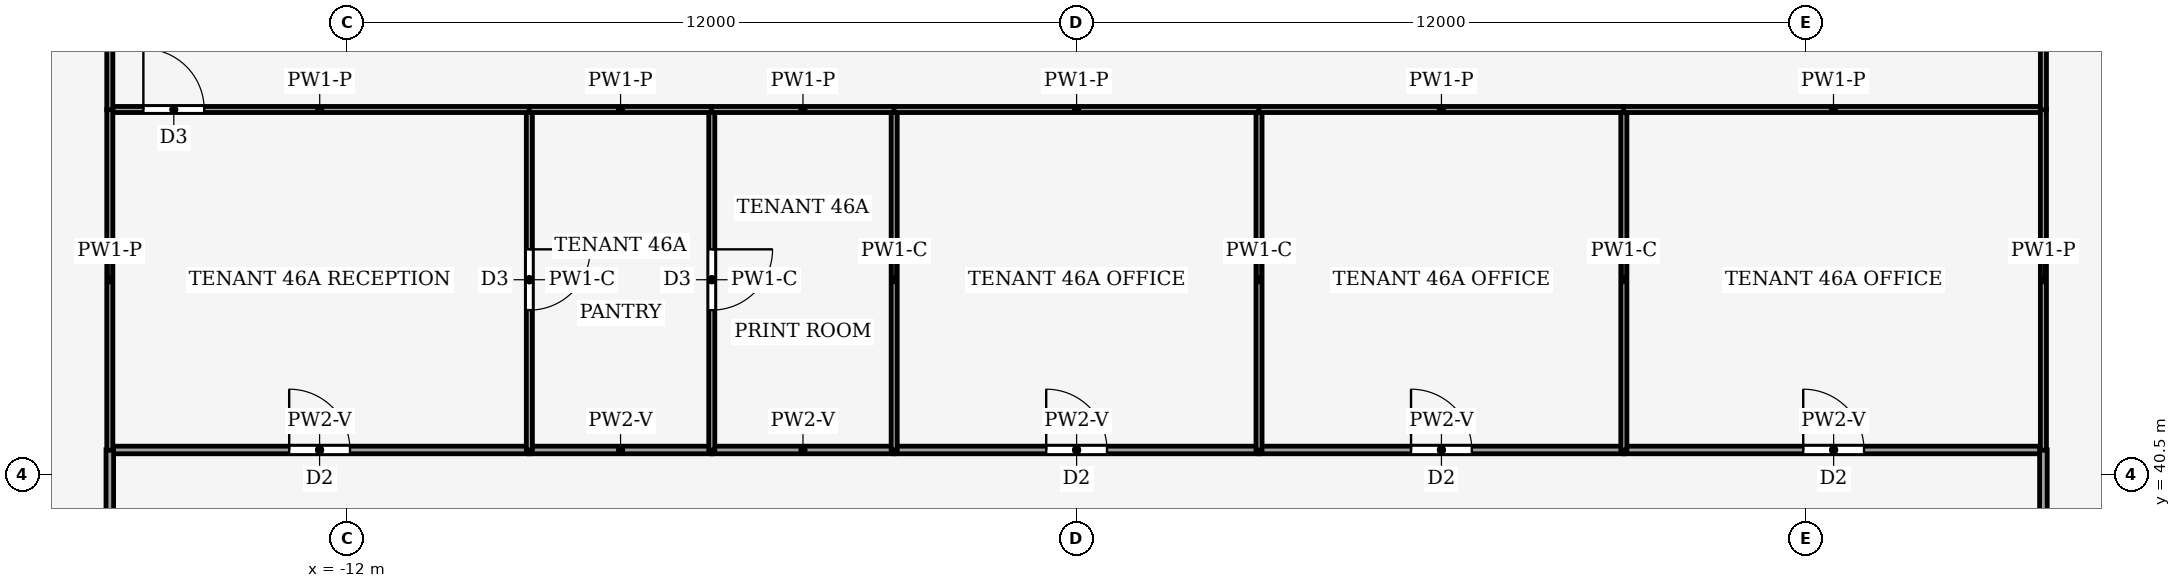
"""IFC4 building model, lengths in metres.
Left out: names, types, materials, properties, quantities, classifications, styles, units other than length and angle.
Written with IfcOpenShell. Run it as: python <this file> out.ifc"""

import sys

from ifc_helpers import new_model, si_unit, direction, frame, frame_2d, origin, place, context, subcontext, project, spatial, rectangle, extrude, element, fill, save


model = new_model("IFC4")
c1 = context("Model", 3, precision=1e-05, world=origin(), true_north=direction((0.0, 1.0)))
c2 = subcontext(c1, "Body", "Model", "MODEL_VIEW")
j1 = project(units=[si_unit("LENGTHUNIT", "METRE"), si_unit("PLANEANGLEUNIT", "RADIAN")], contexts=[c1])
p1 = place(None, origin())
s1 = spatial("IfcSite", under=j1, at=p1, CompositionType="ELEMENT")
p2 = place(p1, origin())
s2 = spatial("IfcBuilding", under=s1, at=p2, CompositionType="ELEMENT")
p3 = place(p2, frame((0.0, 0.0, 202.0)))
s3 = spatial("IfcBuildingStorey", under=s2, at=p3, CompositionType="ELEMENT", Elevation=202.0)
p4 = place(p3, frame((-15.9, 40.9, 0.0), z_axis=(0.0, 0.0, 1.0), x_axis=(1.0, 0.0, 0.0)))
e1 = element("IfcWall", 1, at=p4, inside=s3, PredefinedType="PARTITIONING", context=c2, shape_type="SweptSolid", body=[
    extrude(rectangle(XDim=6.9, YDim=0.125, at=frame_2d((3.45, 0.0))), origin(), (0.0, 0.0, 1.0), 3.44),
])
p5 = place(p4, frame((2.95, 0.0, 0.0)))
e2 = element("IfcOpeningElement", 2, at=p5, cuts=e1, PredefinedType="OPENING", context=c2, shape_type="SweptSolid", body=[
    extrude(rectangle(XDim=1.0, YDim=2.1, at=frame_2d((0.5, 1.05))), frame((0.0, 0.073, 0.0), z_axis=(0.0, -1.0, 0.0), x_axis=(1.0, 0.0, 0.0)), (0.0, 0.0, 1.0), 0.145),
])
for number, where, z_axis, x_axis in (
    (3, (-6.0, 40.9, 0.0), (0.0, 0.0, 1.0), (-1.0, 0.0, 0.0)),
    (4, (-3.0, 40.9, 0.0), (0.0, 0.0, 1.0), (-1.0, 0.0, 0.0)),
):
    element("IfcWall", number, at=place(p3, frame(where, z_axis=z_axis, x_axis=x_axis)), inside=s3, PredefinedType="PARTITIONING", context=c2, shape_type="SweptSolid", body=[
        extrude(rectangle(XDim=3.0, YDim=0.125, at=frame_2d((1.5, 0.0))), origin(), (0.0, 0.0, 1.0), 3.44),
    ])
p6 = place(p3, frame((-3.0, 40.9, 0.0), z_axis=(0.0, 0.0, 1.0), x_axis=(1.0, 0.0, 0.0)))
e5 = element("IfcWall", 5, at=p6, inside=s3, PredefinedType="PARTITIONING", context=c2, shape_type="SweptSolid", body=[
    extrude(rectangle(XDim=6.0, YDim=0.125, at=frame_2d((3.0, 0.0))), origin(), (0.0, 0.0, 1.0), 3.44),
])
p7 = place(p6, frame((2.5, 0.0, 0.0)))
e6 = element("IfcOpeningElement", 6, at=p7, cuts=e5, PredefinedType="OPENING", context=c2, shape_type="SweptSolid", body=[
    extrude(rectangle(XDim=1.0, YDim=2.1, at=frame_2d((0.5, 1.05))), frame((0.0, 0.073, 0.0), z_axis=(0.0, -1.0, 0.0), x_axis=(1.0, 0.0, 0.0)), (0.0, 0.0, 1.0), 0.145),
])
p8 = place(p3, frame((3.0, 40.9, 0.0), z_axis=(0.0, 0.0, 1.0), x_axis=(1.0, 0.0, 0.0)))
e7 = element("IfcWall", 7, at=p8, inside=s3, PredefinedType="PARTITIONING", context=c2, shape_type="SweptSolid", body=[
    extrude(rectangle(XDim=6.0, YDim=0.125, at=frame_2d((3.0, 0.0))), origin(), (0.0, 0.0, 1.0), 3.44),
])
p9 = place(p8, frame((2.5, 0.0, 0.0)))
e8 = element("IfcOpeningElement", 8, at=p9, cuts=e7, PredefinedType="OPENING", context=c2, shape_type="SweptSolid", body=[
    extrude(rectangle(XDim=1.0, YDim=2.1, at=frame_2d((0.5, 1.05))), frame((0.0, 0.073, 0.0), z_axis=(0.0, -1.0, 0.0), x_axis=(1.0, 0.0, 0.0)), (0.0, 0.0, 1.0), 0.145),
])
p10 = place(p3, frame((9.0, 40.9, 0.0), z_axis=(0.0, 0.0, 1.0), x_axis=(1.0, 0.0, 0.0)))
e9 = element("IfcWall", 9, at=p10, inside=s3, PredefinedType="PARTITIONING", context=c2, shape_type="SweptSolid", body=[
    extrude(rectangle(XDim=6.9, YDim=0.125, at=frame_2d((3.45, 0.0))), origin(), (0.0, 0.0, 1.0), 3.44),
])
p11 = place(p10, frame((2.95, 0.0, 0.0)))
e10 = element("IfcOpeningElement", 10, at=p11, cuts=e9, PredefinedType="OPENING", context=c2, shape_type="SweptSolid", body=[
    extrude(rectangle(XDim=1.0, YDim=2.1, at=frame_2d((0.5, 1.05))), frame((0.0, 0.073, 0.0), z_axis=(0.0, -1.0, 0.0), x_axis=(1.0, 0.0, 0.0)), (0.0, 0.0, 1.0), 0.145),
])
p12 = place(p3, frame((-15.9, 34.5, 0.0), z_axis=(0.0, 0.0, 1.0), x_axis=(0.0, 1.0, 0.0)))
e11 = element("IfcWall", 11, at=p12, inside=s3, PredefinedType="PARTITIONING", context=c2, shape_type="SweptSolid", body=[
    extrude(rectangle(XDim=6.404, YDim=0.125, at=frame_2d((3.202, 0.0))), origin(), (0.0, 0.0, 1.0), 3.14),
])
p13 = place(p12, frame((2.702, 0.0, 0.0)))
e12 = element("IfcOpeningElement", 12, at=p13, cuts=e11, PredefinedType="OPENING", context=c2, shape_type="SweptSolid", body=[
    extrude(rectangle(XDim=1.0, YDim=2.1, at=frame_2d((0.5, 1.05))), frame((0.0, 0.073, 0.0), z_axis=(0.0, -1.0, 0.0), x_axis=(1.0, 0.0, 0.0)), (0.0, 0.0, 1.0), 0.145),
])
p14 = place(p3, frame((15.9, 40.904, 0.0), z_axis=(0.0, 0.0, 1.0), x_axis=(0.0, -1.0, 0.0)))
e13 = element("IfcWall", 13, at=p14, inside=s3, PredefinedType="PARTITIONING", context=c2, shape_type="SweptSolid", body=[
    extrude(rectangle(XDim=3.404, YDim=0.125, at=frame_2d((1.702, 0.0))), origin(), (0.0, 0.0, 1.0), 3.14),
])
p15 = place(p14, frame((1.202, 0.0, 0.0)))
e14 = element("IfcOpeningElement", 14, at=p15, cuts=e13, PredefinedType="OPENING", context=c2, shape_type="SweptSolid", body=[
    extrude(rectangle(XDim=1.0, YDim=2.1, at=frame_2d((0.5, 1.05))), frame((0.0, 0.073, 0.0), z_axis=(0.0, -1.0, 0.0), x_axis=(1.0, 0.0, 0.0)), (0.0, 0.0, 1.0), 0.145),
])
p16 = place(p3, frame((-9.0, 46.5, 0.0), z_axis=(0.0, 0.0, 1.0), x_axis=(0.0, -1.0, 0.0)))
e15 = element("IfcWall", 15, at=p16, inside=s3, PredefinedType="PARTITIONING", context=c2, shape_type="SweptSolid", body=[
    extrude(rectangle(XDim=5.6, YDim=0.1, at=frame_2d((2.8, 0.0))), origin(), (0.0, 0.0, 1.0), 3.87),
])
p17 = place(p16, frame((2.3, 0.0, 0.0)))
e16 = element("IfcOpeningElement", 16, at=p17, cuts=e15, PredefinedType="OPENING", context=c2, shape_type="SweptSolid", body=[
    extrude(rectangle(XDim=1.0, YDim=2.1, at=frame_2d((0.5, 1.05))), frame((0.0, 0.06, 0.0), z_axis=(0.0, -1.0, 0.0), x_axis=(1.0, 0.0, 0.0)), (0.0, 0.0, 1.0), 0.12),
])
p18 = place(p3, frame((-15.9, 46.5, 0.0), z_axis=(0.0, 0.0, 1.0), x_axis=(1.0, 0.0, 0.0)))
e17 = element("IfcWall", 17, at=p18, inside=s3, PredefinedType="PARTITIONING", context=c2, shape_type="SweptSolid", body=[
    extrude(rectangle(XDim=6.904, YDim=0.1, at=frame_2d((3.452, 0.0))), origin(), (0.0, 0.0, 1.0), 3.44),
])
p19 = place(p18, frame((0.552, 0.0, 0.0)))
e18 = element("IfcOpeningElement", 18, at=p19, cuts=e17, PredefinedType="OPENING", context=c2, shape_type="SweptSolid", body=[
    extrude(rectangle(XDim=1.0, YDim=2.1, at=frame_2d((0.5, 1.05))), frame((0.0, 0.06, 0.0), z_axis=(0.0, -1.0, 0.0), x_axis=(1.0, 0.0, 0.0)), (0.0, 0.0, 1.0), 0.12),
])
p20 = place(p3, frame((-15.9, 46.504, 0.0), z_axis=(0.0, 0.0, 1.0), x_axis=(0.0, -1.0, 0.0)))
e19 = element("IfcWall", 19, at=p20, inside=s3, PredefinedType="PARTITIONING", context=c2, shape_type="SweptSolid", body=[
    extrude(rectangle(XDim=5.608, YDim=0.1, at=frame_2d((2.804, 0.0))), origin(), (0.0, 0.0, 1.0), 3.44),
])
p21 = place(p3, frame((-6.0, 46.5, 0.0), z_axis=(0.0, 0.0, 1.0), x_axis=(0.0, -1.0, 0.0)))
e20 = element("IfcWall", 20, at=p21, inside=s3, PredefinedType="PARTITIONING", context=c2, shape_type="SweptSolid", body=[
    extrude(rectangle(XDim=5.6, YDim=0.1, at=frame_2d((2.8, 0.0))), origin(), (0.0, 0.0, 1.0), 3.87),
])
p22 = place(p21, frame((2.3, 0.0, 0.0)))
e21 = element("IfcOpeningElement", 21, at=p22, cuts=e20, PredefinedType="OPENING", context=c2, shape_type="SweptSolid", body=[
    extrude(rectangle(XDim=1.0, YDim=2.1, at=frame_2d((0.5, 1.05))), frame((0.0, 0.06, 0.0), z_axis=(0.0, -1.0, 0.0), x_axis=(1.0, 0.0, 0.0)), (0.0, 0.0, 1.0), 0.12),
])
p23 = place(p3, frame((-5.996, 46.5, 0.0), z_axis=(0.0, 0.0, 1.0), x_axis=(-1.0, 0.0, 0.0)))
e22 = element("IfcWall", 22, at=p23, inside=s3, PredefinedType="PARTITIONING", context=c2, shape_type="SweptSolid", body=[
    extrude(rectangle(XDim=3.008, YDim=0.1, at=frame_2d((1.504, 0.0))), origin(), (0.0, 0.0, 1.0), 3.44),
])
p24 = place(p3, frame((-3.0, 40.9, 0.0), z_axis=(0.0, 0.0, 1.0), x_axis=(0.0, 1.0, 0.0)))
e23 = element("IfcWall", 23, at=p24, inside=s3, PredefinedType="PARTITIONING", context=c2, shape_type="SweptSolid", body=[
    extrude(rectangle(XDim=5.6, YDim=0.1, at=frame_2d((2.8, 0.0))), origin(), (0.0, 0.0, 1.0), 3.87),
])
p25 = place(p3, frame((-2.996, 46.5, 0.0), z_axis=(0.0, 0.0, 1.0), x_axis=(-1.0, 0.0, 0.0)))
e24 = element("IfcWall", 24, at=p25, inside=s3, PredefinedType="PARTITIONING", context=c2, shape_type="SweptSolid", body=[
    extrude(rectangle(XDim=3.008, YDim=0.1, at=frame_2d((1.504, 0.0))), origin(), (0.0, 0.0, 1.0), 3.44),
])
p26 = place(p3, frame((3.0, 40.9, 0.0), z_axis=(0.0, 0.0, 1.0), x_axis=(0.0, 1.0, 0.0)))
e25 = element("IfcWall", 25, at=p26, inside=s3, PredefinedType="PARTITIONING", context=c2, shape_type="SweptSolid", body=[
    extrude(rectangle(XDim=5.6, YDim=0.1, at=frame_2d((2.8, 0.0))), origin(), (0.0, 0.0, 1.0), 3.87),
])
p27 = place(p3, frame((3.004, 46.5, 0.0), z_axis=(0.0, 0.0, 1.0), x_axis=(-1.0, 0.0, 0.0)))
e26 = element("IfcWall", 26, at=p27, inside=s3, PredefinedType="PARTITIONING", context=c2, shape_type="SweptSolid", body=[
    extrude(rectangle(XDim=6.008, YDim=0.1, at=frame_2d((3.004, 0.0))), origin(), (0.0, 0.0, 1.0), 3.44),
])
p28 = place(p3, frame((9.0, 40.9, 0.0), z_axis=(0.0, 0.0, 1.0), x_axis=(0.0, 1.0, 0.0)))
e27 = element("IfcWall", 27, at=p28, inside=s3, PredefinedType="PARTITIONING", context=c2, shape_type="SweptSolid", body=[
    extrude(rectangle(XDim=5.6, YDim=0.1, at=frame_2d((2.8, 0.0))), origin(), (0.0, 0.0, 1.0), 3.87),
])
p29 = place(p3, frame((9.004, 46.5, 0.0), z_axis=(0.0, 0.0, 1.0), x_axis=(-1.0, 0.0, 0.0)))
e28 = element("IfcWall", 28, at=p29, inside=s3, PredefinedType="PARTITIONING", context=c2, shape_type="SweptSolid", body=[
    extrude(rectangle(XDim=6.008, YDim=0.1, at=frame_2d((3.004, 0.0))), origin(), (0.0, 0.0, 1.0), 3.44),
])
p30 = place(p3, frame((15.9, 46.5, 0.0), z_axis=(0.0, 0.0, 1.0), x_axis=(-1.0, 0.0, 0.0)))
e29 = element("IfcWall", 29, at=p30, inside=s3, PredefinedType="PARTITIONING", context=c2, shape_type="SweptSolid", body=[
    extrude(rectangle(XDim=6.904, YDim=0.1, at=frame_2d((3.452, 0.0))), origin(), (0.0, 0.0, 1.0), 3.44),
])
p31 = place(p3, frame((15.9, 40.896, 0.0), z_axis=(0.0, 0.0, 1.0), x_axis=(0.0, 1.0, 0.0)))
e30 = element("IfcWall", 30, at=p31, inside=s3, PredefinedType="PARTITIONING", context=c2, shape_type="SweptSolid", body=[
    extrude(rectangle(XDim=5.608, YDim=0.1, at=frame_2d((2.804, 0.0))), origin(), (0.0, 0.0, 1.0), 3.44),
])
for number, where, z_axis, x_axis in (
    (31, (-15.9, 61.504, 0.0), (0.0, 0.0, 1.0), (0.0, -1.0, 0.0)),
    (32, (15.9, 46.496, 0.0), (0.0, 0.0, 1.0), (0.0, 1.0, 0.0)),
):
    element("IfcWall", number, at=place(p3, frame(where, z_axis=z_axis, x_axis=x_axis)), inside=s3, PredefinedType="PARTITIONING", context=c2, shape_type="SweptSolid", body=[
        extrude(rectangle(XDim=15.008, YDim=0.1, at=frame_2d((7.504, 0.0))), origin(), (0.0, 0.0, 1.0), 3.24),
    ])
p32 = place(p5, origin())
e33 = element("IfcDoor", 33, at=p32, inside=s3, OperationType="SINGLE_SWING_LEFT", PredefinedType="DOOR", context=c2, shape_type="SweptSolid", body=[
    extrude(rectangle(XDim=1.0, YDim=2.1, at=frame_2d((0.5, 1.05))), frame((0.0, 0.025, 0.0), z_axis=(0.0, -1.0, 0.0), x_axis=(1.0, 0.0, 0.0)), (0.0, 0.0, 1.0), 0.05),
])
fill(e2, e33)
p33 = place(p7, origin())
e34 = element("IfcDoor", 34, at=p33, inside=s3, OperationType="SINGLE_SWING_RIGHT", PredefinedType="DOOR", context=c2, shape_type="SweptSolid", body=[
    extrude(rectangle(XDim=1.0, YDim=2.1, at=frame_2d((0.5, 1.05))), frame((0.0, 0.025, 0.0), z_axis=(0.0, -1.0, 0.0), x_axis=(1.0, 0.0, 0.0)), (0.0, 0.0, 1.0), 0.05),
])
fill(e6, e34)
p34 = place(p9, origin())
e35 = element("IfcDoor", 35, at=p34, inside=s3, OperationType="SINGLE_SWING_LEFT", PredefinedType="DOOR", context=c2, shape_type="SweptSolid", body=[
    extrude(rectangle(XDim=1.0, YDim=2.1, at=frame_2d((0.5, 1.05))), frame((0.0, 0.025, 0.0), z_axis=(0.0, -1.0, 0.0), x_axis=(1.0, 0.0, 0.0)), (0.0, 0.0, 1.0), 0.05),
])
fill(e8, e35)
p35 = place(p11, origin())
e36 = element("IfcDoor", 36, at=p35, inside=s3, OperationType="SINGLE_SWING_RIGHT", PredefinedType="DOOR", context=c2, shape_type="SweptSolid", body=[
    extrude(rectangle(XDim=1.0, YDim=2.1, at=frame_2d((0.5, 1.05))), frame((0.0, 0.025, 0.0), z_axis=(0.0, -1.0, 0.0), x_axis=(1.0, 0.0, 0.0)), (0.0, 0.0, 1.0), 0.05),
])
fill(e10, e36)
p36 = place(p17, origin())
e37 = element("IfcDoor", 37, at=p36, inside=s3, OperationType="SINGLE_SWING_RIGHT", PredefinedType="DOOR", context=c2, shape_type="SweptSolid", body=[
    extrude(rectangle(XDim=1.0, YDim=2.1, at=frame_2d((0.5, 1.05))), frame((0.0, 0.025, 0.0), z_axis=(0.0, -1.0, 0.0), x_axis=(1.0, 0.0, 0.0)), (0.0, 0.0, 1.0), 0.05),
])
fill(e16, e37)
p37 = place(p19, origin())
e38 = element("IfcDoor", 38, at=p37, inside=s3, OperationType="SINGLE_SWING_LEFT", PredefinedType="DOOR", context=c2, shape_type="SweptSolid", body=[
    extrude(rectangle(XDim=1.0, YDim=2.1, at=frame_2d((0.5, 1.05))), frame((0.0, 0.025, 0.0), z_axis=(0.0, -1.0, 0.0), x_axis=(1.0, 0.0, 0.0)), (0.0, 0.0, 1.0), 0.05),
])
fill(e18, e38)
p38 = place(p22, origin())
e39 = element("IfcDoor", 39, at=p38, inside=s3, OperationType="SINGLE_SWING_RIGHT", PredefinedType="DOOR", context=c2, shape_type="SweptSolid", body=[
    extrude(rectangle(XDim=1.0, YDim=2.1, at=frame_2d((0.5, 1.05))), frame((0.0, 0.025, 0.0), z_axis=(0.0, -1.0, 0.0), x_axis=(1.0, 0.0, 0.0)), (0.0, 0.0, 1.0), 0.05),
])
fill(e21, e39)
save(model, sys.argv[1])
